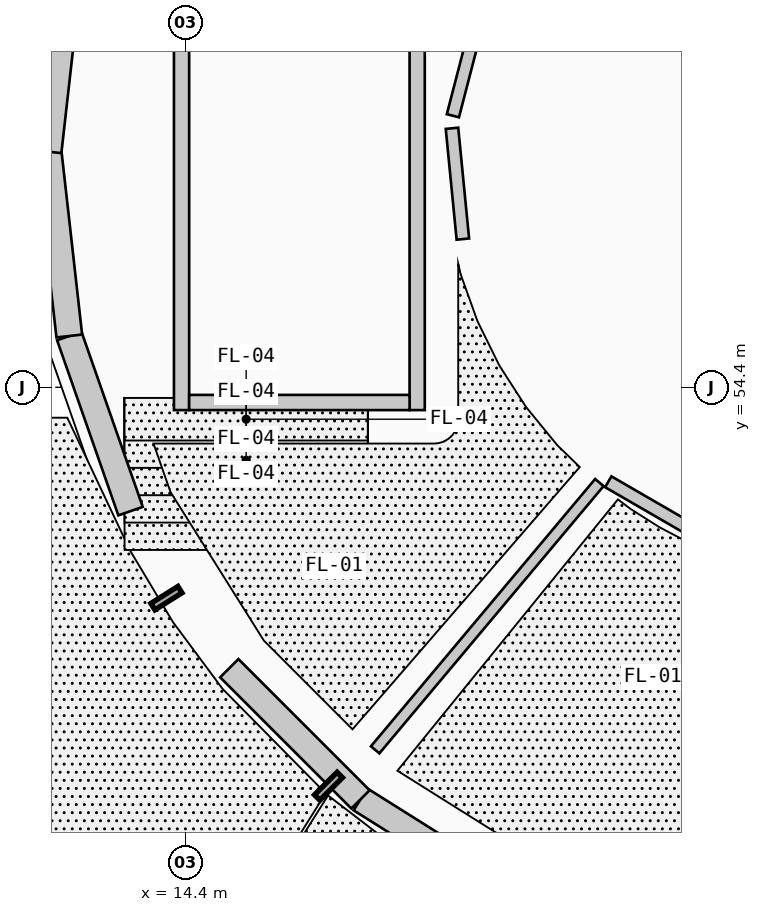
"""IFC4 building model, lengths in metres.
Left out: names, types, materials, properties, quantities, classifications, styles, units other than length and angle.
Written with IfcOpenShell. Run it as: python <this file> out.ifc"""

import sys

from ifc_helpers import new_model, si_unit, direction, frame, frame_2d, origin, origin_2d, place, context, subcontext, project, spatial, rectangle, circle, extrude, element, fill, save


model = new_model("IFC4")
c1 = context("Model", 3, precision=1e-05, world=origin(), true_north=direction((0.0, 1.0)))
c2 = subcontext(c1, "Body", "Model", "MODEL_VIEW")
j1 = project(units=[si_unit("LENGTHUNIT", "METRE"), si_unit("PLANEANGLEUNIT", "RADIAN")], contexts=[c1])
p1 = place(None, origin())
s1 = spatial("IfcSite", under=j1, at=p1, CompositionType="ELEMENT")
p2 = place(p1, origin())
s2 = spatial("IfcBuilding", under=s1, at=p2, CompositionType="ELEMENT")
p3 = place(p2, origin())
s3 = spatial("IfcBuildingStorey", under=s2, at=p3, CompositionType="ELEMENT", Elevation=0.0)
for number, where, z_axis, x_axis in (
    (1, (13.12, 57.5, 0.0), (0.0, 0.0, 1.0), (1.0, 0.0, 0.0)),
    (2, (14.148, 52.996, 0.0), (0.0, 0.0, 1.0), (1.0, 0.0, 0.0)),
    (3, (17.028, 49.385, 0.0), (0.0, 0.0, 1.0), (1.0, 0.0, 0.0)),
):
    element("IfcColumn", number, at=place(p3, frame(where, z_axis=z_axis, x_axis=x_axis)), inside=s3, PredefinedType="PILASTER", context=c2, shape_type="SweptSolid", body=[
        extrude(circle(Radius=0.275, at=origin_2d()), origin(), (0.0, 0.0, 1.0), 4.55),
    ])
p4 = place(p3, frame((19.54, 53.54, 0.0), z_axis=(0.0, 0.0, 1.0), x_axis=(1.0, 0.0, 0.0)))
e4 = element("IfcColumn", 4, at=p4, inside=s3, PredefinedType="COLUMN", context=c2, shape_type="SweptSolid", body=[
    extrude(rectangle(XDim=0.315, YDim=0.315, at=origin_2d()), origin(), (0.0, 0.0, 1.0), 4.55),
])
p5 = place(p3, frame((18.771, 47.679, 0.0), z_axis=(0.0, 0.0, 1.0), x_axis=(-0.846658434148, 0.532136726684, 0.0)))
e5 = element("IfcWall", 5, at=p5, inside=s3, PredefinedType="SOLIDWALL", context=c2, shape_type="SweptSolid", body=[
    extrude(rectangle(XDim=2.441, YDim=0.34, at=frame_2d((1.221, 0.0))), origin(), (0.0, 0.0, 1.0), 3.659),
])
p6 = place(p5, frame((0.571, 0.0, 0.0)))
e6 = element("IfcOpeningElement", 6, at=p6, cuts=e5, PredefinedType="OPENING", context=c2, shape_type="SweptSolid", body=[
    extrude(rectangle(XDim=1.3, YDim=2.25, at=frame_2d((0.65, 1.125))), frame((0.0, 0.18, 0.0), z_axis=(0.0, -1.0, 0.0), x_axis=(1.0, 0.0, 0.0)), (0.0, 0.0, 1.0), 0.36),
])
for number, where, z_axis, x_axis in (
    (7, (16.704, 48.978, 0.0), (0.0, 0.0, 1.0), (-0.707, 0.707, 0.0)),
    (8, (13.679, 52.771, 0.0), (0.0, 0.0, 1.0), (-0.33, 0.944, 0.0)),
):
    element("IfcWall", number, at=place(p3, frame(where, z_axis=z_axis, x_axis=x_axis)), inside=s3, PredefinedType="SOLIDWALL", context=c2, shape_type="SweptSolid", body=[
        extrude(rectangle(XDim=2.441, YDim=0.34, at=frame_2d((1.22, 0.0))), origin(), (0.0, 0.0, 1.0), 3.659),
    ])
for number, where, z_axis, x_axis in (
    (9, (12.873, 55.075, 0.0), (0.0, 0.0, 1.0), (-0.112, 0.994, 0.0)),
    (10, (12.6, 57.5, 0.0), (0.0, 0.0, 1.0), (0.112, 0.994, 0.0)),
):
    element("IfcWall", number, at=place(p3, frame(where, z_axis=z_axis, x_axis=x_axis)), inside=s3, PredefinedType="SOLIDWALL", context=c2, shape_type="SweptSolid", body=[
        extrude(rectangle(XDim=2.44, YDim=0.34, at=frame_2d((1.22, 0.0))), origin(), (0.0, 0.0, 1.0), 3.659),
    ])
p7 = place(p3, frame((17.45, 54.1, 0.0), z_axis=(0.0, 0.0, 1.0), x_axis=(0.0, 1.0, 0.0)))
e11 = element("IfcWall", 11, at=p7, inside=s3, PredefinedType="SHEAR", context=c2, shape_type="SweptSolid", body=[
    extrude(rectangle(XDim=6.8, YDim=0.2, at=frame_2d((3.4, 0.0))), origin(), (0.0, 0.0, 1.0), 4.305),
])
p8 = place(p7, frame((0.38, 0.0, 0.0)))
e12 = element("IfcOpeningElement", 12, at=p8, cuts=e11, PredefinedType="OPENING", context=c2, shape_type="SweptSolid", body=[
    extrude(rectangle(XDim=1.05, YDim=2.15, at=frame_2d((0.525, 1.075))), frame((0.0, 0.11, 0.0), z_axis=(0.0, -1.0, 0.0), x_axis=(1.0, 0.0, 0.0)), (0.0, 0.0, 1.0), 0.22),
])
p9 = place(p3, frame((14.35, 54.1, 0.0), z_axis=(0.0, 0.0, 1.0), x_axis=(0.0, 1.0, 0.0)))
e13 = element("IfcWall", 13, at=p9, inside=s3, PredefinedType="SHEAR", context=c2, shape_type="SweptSolid", body=[
    extrude(rectangle(XDim=6.8, YDim=0.2, at=frame_2d((3.4, 0.0))), origin(), (0.0, 0.0, 1.0), 4.305),
])
p10 = place(p3, frame((17.35, 54.2, 0.0), z_axis=(0.0, 0.0, 1.0), x_axis=(-1.0, 0.0, 0.0)))
e14 = element("IfcWall", 14, at=p10, inside=s3, PredefinedType="SHEAR", context=c2, shape_type="SweptSolid", body=[
    extrude(rectangle(XDim=2.9, YDim=0.2, at=frame_2d((1.45, 0.0))), origin(), (0.0, 0.0, 1.0), 4.305),
])
p11 = place(p3, frame((19.847, 53.147, 0.0), z_axis=(0.0, 0.0, 1.0), x_axis=(-0.64262938355, -0.766177182771, 0.0)))
e15 = element("IfcWall", 15, at=p11, inside=s3, PredefinedType="PARTITIONING", context=c2, shape_type="SweptSolid", body=[
    extrude(rectangle(XDim=4.59, YDim=0.145, at=frame_2d((2.295, 0.0))), origin(), (0.0, 0.0, 1.0), 3.634),
])
p12 = place(p3, frame((18.395, 59.803, 0.0), z_axis=(0.0, 0.0, 1.0), x_axis=(-0.251275827958, -0.967915522287, 0.0)))
e16 = element("IfcWall", 16, at=p12, inside=s3, PredefinedType="PARTITIONING", context=c2, shape_type="SweptSolid", body=[
    extrude(rectangle(XDim=1.891, YDim=0.165, at=frame_2d((0.945, 0.0))), origin(), (0.0, 0.0, 1.0), 3.634),
])
p13 = place(p3, frame((17.908, 57.808, 0.0), z_axis=(0.0, 0.0, 1.0), x_axis=(0.097655572539, -0.995220271675, 0.0)))
e17 = element("IfcWall", 17, at=p13, inside=s3, PredefinedType="PARTITIONING", context=c2, shape_type="SweptSolid", body=[
    extrude(rectangle(XDim=1.465, YDim=0.165, at=frame_2d((0.732, 0.0))), origin(), (0.0, 0.0, 1.0), 3.634),
])
p14 = place(p3, frame((19.964, 53.157, 0.0), z_axis=(0.0, 0.0, 1.0), x_axis=(0.865448363254, -0.500998134269, 0.0)))
e18 = element("IfcWall", 18, at=p14, inside=s3, PredefinedType="PARTITIONING", context=c2, shape_type="SweptSolid", body=[
    extrude(rectangle(XDim=1.767, YDim=0.165, at=frame_2d((0.883, 0.0))), origin(), (0.0, 0.0, 1.0), 3.634),
])
p15 = place(p14, frame((0.403, 0.0, 0.0)))
e19 = element("IfcOpeningElement", 19, at=p15, cuts=e18, PredefinedType="OPENING", context=c2, shape_type="SweptSolid", body=[
    extrude(rectangle(XDim=0.96, YDim=2.12, at=frame_2d((0.48, 1.06))), frame((0.0, 0.093, 0.0), z_axis=(0.0, -1.0, 0.0), x_axis=(1.0, 0.0, 0.0)), (0.0, 0.0, 1.0), 0.185),
])
p16 = place(p6, origin())
e20 = element("IfcDoor", 20, at=p16, inside=s3, OperationType="SINGLE_SWING_RIGHT", PredefinedType="DOOR", context=c2, shape_type="SweptSolid", body=[
    extrude(rectangle(XDim=1.3, YDim=2.25, at=frame_2d((0.65, 1.125))), frame((0.0, 0.025, 0.0), z_axis=(0.0, -1.0, 0.0), x_axis=(1.0, 0.0, 0.0)), (0.0, 0.0, 1.0), 0.05),
])
fill(e6, e20)
p17 = place(p8, origin())
e21 = element("IfcDoor", 21, at=p17, inside=s3, OperationType="SINGLE_SWING_LEFT", PredefinedType="DOOR", context=c2, shape_type="SweptSolid", body=[
    extrude(rectangle(XDim=1.05, YDim=2.15, at=frame_2d((0.525, 1.075))), frame((0.0, 0.025, 0.0), z_axis=(0.0, -1.0, 0.0), x_axis=(1.0, 0.0, 0.0)), (0.0, 0.0, 1.0), 0.05),
])
fill(e12, e21)
p18 = place(p15, origin())
e22 = element("IfcDoor", 22, at=p18, inside=s3, OperationType="SINGLE_SWING_LEFT", PredefinedType="DOOR", context=c2, shape_type="SweptSolid", body=[
    extrude(rectangle(XDim=0.96, YDim=2.12, at=frame_2d((0.48, 1.06))), frame((0.0, 0.025, 0.0), z_axis=(0.0, -1.0, 0.0), x_axis=(1.0, 0.0, 0.0)), (0.0, 0.0, 1.0), 0.05),
])
fill(e19, e22)
save(model, sys.argv[1])
